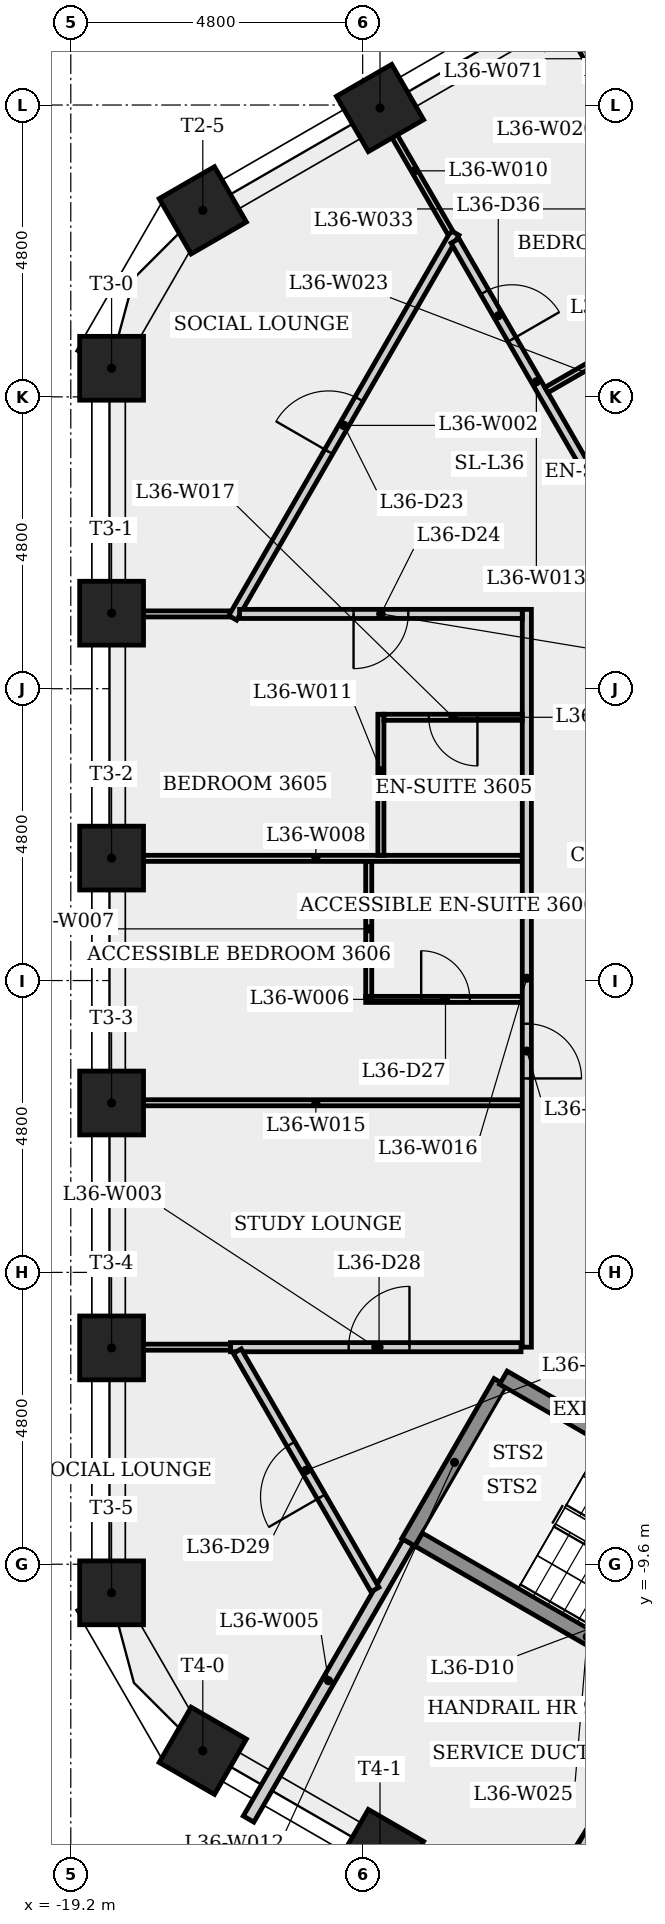
"""IFC4 building model, lengths in metres.
Left out: names, types, materials, properties, quantities, classifications, styles, units other than length and angle.
Written with IfcOpenShell. Run it as: python <this file> out.ifc"""

import sys

from ifc_helpers import new_model, si_unit, direction, frame, frame_2d, origin, origin_2d, place, context, subcontext, project, spatial, rectangle, extrude, element, fill, save


model = new_model("IFC4")
c1 = context("Model", 3, precision=1e-05, world=origin(), true_north=direction((0.0, 1.0)))
c2 = subcontext(c1, "Body", "Model", "MODEL_VIEW")
j1 = project(units=[si_unit("LENGTHUNIT", "METRE"), si_unit("PLANEANGLEUNIT", "RADIAN")], contexts=[c1])
p1 = place(None, origin())
s1 = spatial("IfcSite", under=j1, at=p1, CompositionType="ELEMENT")
p2 = place(p1, origin())
s2 = spatial("IfcBuilding", under=s1, at=p2, CompositionType="ELEMENT")
p3 = place(p2, frame((0.0, 0.0, 135.9)))
s3 = spatial("IfcBuildingStorey", under=s2, at=p3, CompositionType="ELEMENT", Elevation=135.9)
for number, where, z_axis, x_axis in (
    (1, (-14.115, 14.351, 0.0), (0.0, 0.0, 1.0), (-0.5, 0.866, 0.0)),
    (2, (-17.029, 12.668, 0.0), (0.0, 0.0, 1.0), (-0.5, 0.866, 0.0)),
    (3, (-18.529, 10.07, 0.0), (0.0, 0.0, 1.0), (-1.0, 0.0, 0.0)),
    (4, (-18.529, 6.042, 0.0), (0.0, 0.0, 1.0), (-1.0, 0.0, 0.0)),
    (5, (-18.529, 2.014, 0.0), (0.0, 0.0, 1.0), (-1.0, 0.0, 0.0)),
    (6, (-18.529, -2.014, 0.0), (0.0, 0.0, 1.0), (-1.0, 0.0, 0.0)),
    (7, (-18.529, -6.042, 0.0), (0.0, 0.0, 1.0), (-1.0, 0.0, 0.0)),
    (8, (-18.529, -10.07, 0.0), (0.0, 0.0, 1.0), (-1.0, 0.0, 0.0)),
    (9, (-17.029, -12.668, 0.0), (0.0, 0.0, 1.0), (-0.5, -0.866, 0.0)),
    (10, (-14.115, -14.351, 0.0), (0.0, 0.0, 1.0), (-0.5, -0.866, 0.0)),
):
    element("IfcColumn", number, at=place(p3, frame(where, z_axis=z_axis, x_axis=x_axis)), inside=s3, PredefinedType="COLUMN", context=c2, shape_type="SweptSolid", body=[
        extrude(rectangle(XDim=1.05, YDim=1.05, at=origin_2d()), origin(), (0.0, 0.0, 1.0), 4.0),
    ])
p4 = place(p3, frame((-16.574, 6.03, 0.0), z_axis=(0.0, 0.0, 1.0), x_axis=(-1.0, 0.0, 0.0)))
e11 = element("IfcWall", 11, at=p4, inside=s3, PredefinedType="PARTITIONING", context=c2, shape_type="SweptSolid", body=[
    extrude(rectangle(XDim=1.99, YDim=0.1, at=frame_2d((0.995, 0.0))), origin(), (0.0, 0.0, 1.0), 3.6),
])
p5 = place(p3, frame((-16.537, 5.965, 0.0), z_axis=(0.0, 0.0, 1.0), x_axis=(0.500014413017, 0.866017082265, 0.0)))
e12 = element("IfcWall", 12, at=p5, inside=s3, PredefinedType="PARTITIONING", context=c2, shape_type="SweptSolid", body=[
    extrude(rectangle(XDim=7.311, YDim=0.15, at=frame_2d((3.655, 0.0))), origin(), (0.0, 0.0, 1.0), 3.6),
])
p6 = place(p5, frame((3.156, 0.0, 0.0)))
e13 = element("IfcOpeningElement", 13, at=p6, cuts=e12, PredefinedType="OPENING", context=c2, shape_type="SweptSolid", body=[
    extrude(rectangle(XDim=1.0, YDim=2.1, at=frame_2d((0.5, 1.05))), frame((0.0, 0.085, 0.0), z_axis=(0.0, -1.0, 0.0), x_axis=(1.0, 0.0, 0.0)), (0.0, 0.0, 1.0), 0.17),
])
p7 = place(p3, frame((-16.574, -6.03, 0.0), z_axis=(0.0, 0.0, 1.0), x_axis=(1.0, 0.0, 0.0)))
e14 = element("IfcWall", 14, at=p7, inside=s3, PredefinedType="PARTITIONING", context=c2, shape_type="SweptSolid", body=[
    extrude(rectangle(XDim=4.779, YDim=0.15, at=frame_2d((2.389, 0.0))), origin(), (0.0, 0.0, 1.0), 3.6),
])
p8 = place(p7, frame((1.944, 0.0, 0.0)))
e15 = element("IfcOpeningElement", 15, at=p8, cuts=e14, PredefinedType="OPENING", context=c2, shape_type="SweptSolid", body=[
    extrude(rectangle(XDim=1.0, YDim=2.1, at=frame_2d((0.5, 1.05))), frame((0.0, 0.085, 0.0), z_axis=(0.0, -1.0, 0.0), x_axis=(1.0, 0.0, 0.0)), (0.0, 0.0, 1.0), 0.17),
])
p9 = place(p3, frame((-16.574, -6.03, 0.0), z_axis=(0.0, 0.0, 1.0), x_axis=(-1.0, 0.0, 0.0)))
e16 = element("IfcWall", 16, at=p9, inside=s3, PredefinedType="PARTITIONING", context=c2, shape_type="SweptSolid", body=[
    extrude(rectangle(XDim=1.99, YDim=0.1, at=frame_2d((0.995, 0.0))), origin(), (0.0, 0.0, 1.0), 3.6),
])
p10 = place(p3, frame((-16.276, -13.791, 0.0), z_axis=(0.0, 0.0, 1.0), x_axis=(0.499970375258, 0.866042506961, 0.0)))
e17 = element("IfcWall", 17, at=p10, inside=s3, PredefinedType="PLUMBINGWALL", context=c2, shape_type="SweptSolid", body=[
    extrude(rectangle(XDim=5.257, YDim=0.2, at=frame_2d((2.628, 0.0))), origin(), (0.0, 0.0, 1.0), 3.6),
])
p11 = place(p3, frame((-14.35, -0.31, 0.0), z_axis=(0.0, 0.0, 1.0), x_axis=(1.0, 0.0, 0.0)))
e18 = element("IfcWall", 18, at=p11, inside=s3, PredefinedType="PARTITIONING", context=c2, shape_type="SweptSolid", body=[
    extrude(rectangle(XDim=2.575, YDim=0.1, at=frame_2d((1.288, 0.0))), origin(), (0.0, 0.0, 1.0), 3.6),
])
p12 = place(p11, frame((0.913, 0.0, 0.0)))
e19 = element("IfcOpeningElement", 19, at=p12, cuts=e18, PredefinedType="OPENING", context=c2, shape_type="SweptSolid", body=[
    extrude(rectangle(XDim=0.8, YDim=2.1, at=frame_2d((0.4, 1.05))), frame((0.0, 0.06, 0.0), z_axis=(0.0, -1.0, 0.0), x_axis=(1.0, 0.0, 0.0)), (0.0, 0.0, 1.0), 0.12),
])
p13 = place(p3, frame((-14.3, 1.96, 0.0), z_axis=(0.0, 0.0, 1.0), x_axis=(0.0, -1.0, 0.0)))
e20 = element("IfcWall", 20, at=p13, inside=s3, PredefinedType="PARTITIONING", context=c2, shape_type="SweptSolid", body=[
    extrude(rectangle(XDim=2.22, YDim=0.1, at=frame_2d((1.11, 0.0))), origin(), (0.0, 0.0, 1.0), 3.6),
])
p14 = place(p3, frame((-18.564, 2.01, 0.0), z_axis=(0.0, 0.0, 1.0), x_axis=(1.0, 0.0, 0.0)))
e21 = element("IfcWall", 21, at=p14, inside=s3, PredefinedType="PARTITIONING", context=c2, shape_type="SweptSolid", body=[
    extrude(rectangle(XDim=6.789, YDim=0.1, at=frame_2d((3.395, 0.0))), origin(), (0.0, 0.0, 1.0), 3.6),
])
p15 = place(p3, frame((-14.197, -10.017, 0.0), z_axis=(0.0, 0.0, 1.0), x_axis=(-0.500035089595, 0.866005143849, 0.0)))
e22 = element("IfcWall", 22, at=p15, inside=s3, PredefinedType="PARTITIONING", context=c2, shape_type="SweptSolid", body=[
    extrude(rectangle(XDim=4.529, YDim=0.15, at=frame_2d((2.265, 0.0))), origin(), (0.0, 0.0, 1.0), 3.6),
])
p16 = place(p15, frame((1.764, 0.0, 0.0)))
e23 = element("IfcOpeningElement", 23, at=p16, cuts=e22, PredefinedType="OPENING", context=c2, shape_type="SweptSolid", body=[
    extrude(rectangle(XDim=1.0, YDim=2.1, at=frame_2d((0.5, 1.05))), frame((0.0, 0.085, 0.0), z_axis=(0.0, -1.0, 0.0), x_axis=(1.0, 0.0, 0.0)), (0.0, 0.0, 1.0), 0.17),
])
p17 = place(p3, frame((-14.135, 14.339, 0.0), z_axis=(0.0, 0.0, 1.0), x_axis=(0.499991277142, -0.86603043987, 0.0)))
e24 = element("IfcWall", 24, at=p17, inside=s3, PredefinedType="PARTITIONING", context=c2, shape_type="SweptSolid", body=[
    extrude(rectangle(XDim=2.358, YDim=0.1, at=frame_2d((1.179, 0.0))), origin(), (0.0, 0.0, 1.0), 3.6),
])
p18 = place(p3, frame((-14.1, 4.38, 0.0), z_axis=(0.0, 0.0, 1.0), x_axis=(0.0, -1.0, 0.0)))
e25 = element("IfcWall", 25, at=p18, inside=s3, PredefinedType="PARTITIONING", context=c2, shape_type="SweptSolid", body=[
    extrude(rectangle(XDim=2.32, YDim=0.1, at=frame_2d((1.16, 0.0))), origin(), (0.0, 0.0, 1.0), 3.6),
])
p19 = place(p3, frame((-13.648, -9.239, 0.0), z_axis=(0.0, 0.0, 1.0), x_axis=(0.50000556753, 0.866022189346, 0.0)))
e26 = element("IfcWall", 26, at=p19, inside=s3, PredefinedType="SHEAR", context=c2, shape_type="SweptSolid", body=[
    extrude(rectangle(XDim=3.036, YDim=0.25, at=frame_2d((1.518, 0.0))), origin(), (0.0, 0.0, 1.0), 3.6),
])
p20 = place(p3, frame((-12.881, 12.167, 0.0), z_axis=(0.0, 0.0, 1.0), x_axis=(0.500034386872, -0.866005549604, 0.0)))
e27 = element("IfcWall", 27, at=p20, inside=s3, PredefinedType="PARTITIONING", context=c2, shape_type="SweptSolid", body=[
    extrude(rectangle(XDim=5.352, YDim=0.15, at=frame_2d((2.676, 0.0))), origin(), (0.0, 0.0, 1.0), 3.6),
])
p21 = place(p20, frame((0.974, 0.0, 0.0)))
e28 = element("IfcOpeningElement", 28, at=p21, cuts=e27, PredefinedType="OPENING", context=c2, shape_type="SweptSolid", body=[
    extrude(rectangle(XDim=0.9, YDim=2.1, at=frame_2d((0.45, 1.05))), frame((0.0, 0.085, 0.0), z_axis=(0.0, -1.0, 0.0), x_axis=(1.0, 0.0, 0.0)), (0.0, 0.0, 1.0), 0.17),
])
p22 = place(p3, frame((-12.085, -6.532, 0.0), z_axis=(0.0, 0.0, 1.0), x_axis=(0.86604373436, -0.499968249168, 0.0)))
e29 = element("IfcWall", 29, at=p22, inside=s3, PredefinedType="SHEAR", context=c2, shape_type="SweptSolid", body=[
    extrude(rectangle(XDim=1.118, YDim=0.25, at=frame_2d((0.559, 0.0))), origin(), (0.0, 0.0, 1.0), 3.6),
])
p23 = place(p3, frame((-11.775, -2.01, 0.0), z_axis=(0.0, 0.0, 1.0), x_axis=(-1.0, 0.0, 0.0)))
e30 = element("IfcWall", 30, at=p23, inside=s3, PredefinedType="PARTITIONING", context=c2, shape_type="SweptSolid", body=[
    extrude(rectangle(XDim=6.789, YDim=0.1, at=frame_2d((3.395, 0.0))), origin(), (0.0, 0.0, 1.0), 3.6),
])
p24 = place(p3, frame((-11.7, 6.105, 0.0), z_axis=(0.0, 0.0, 1.0), x_axis=(0.0, -1.0, 0.0)))
e31 = element("IfcWall", 31, at=p24, inside=s3, PredefinedType="PARTITIONING", context=c2, shape_type="SweptSolid", body=[
    extrude(rectangle(XDim=12.135, YDim=0.15, at=frame_2d((6.067, 0.0))), origin(), (0.0, 0.0, 1.0), 3.6),
])
p25 = place(p24, frame((6.815, 0.0, 0.0)))
e32 = element("IfcOpeningElement", 32, at=p25, cuts=e31, PredefinedType="OPENING", context=c2, shape_type="SweptSolid", body=[
    extrude(rectangle(XDim=0.9, YDim=2.1, at=frame_2d((0.45, 1.05))), frame((0.0, 0.085, 0.0), z_axis=(0.0, -1.0, 0.0), x_axis=(1.0, 0.0, 0.0)), (0.0, 0.0, 1.0), 0.17),
])
p26 = place(p3, frame((-11.775, 4.33, 0.0), z_axis=(0.0, 0.0, 1.0), x_axis=(-1.0, 0.0, 0.0)))
e33 = element("IfcWall", 33, at=p26, inside=s3, PredefinedType="PARTITIONING", context=c2, shape_type="SweptSolid", body=[
    extrude(rectangle(XDim=2.275, YDim=0.1, at=frame_2d((1.138, 0.0))), origin(), (0.0, 0.0, 1.0), 3.6),
])
p27 = place(p26, frame((0.738, 0.0, 0.0)))
e34 = element("IfcOpeningElement", 34, at=p27, cuts=e33, PredefinedType="OPENING", context=c2, shape_type="SweptSolid", body=[
    extrude(rectangle(XDim=0.8, YDim=2.1, at=frame_2d((0.4, 1.05))), frame((0.0, 0.06, 0.0), z_axis=(0.0, -1.0, 0.0), x_axis=(1.0, 0.0, 0.0)), (0.0, 0.0, 1.0), 0.12),
])
p28 = place(p3, frame((-11.775, 6.03, 0.0), z_axis=(0.0, 0.0, 1.0), x_axis=(-1.0, 0.0, 0.0)))
e35 = element("IfcWall", 35, at=p28, inside=s3, PredefinedType="PARTITIONING", context=c2, shape_type="SweptSolid", body=[
    extrude(rectangle(XDim=4.649, YDim=0.15, at=frame_2d((2.325, 0.0))), origin(), (0.0, 0.0, 1.0), 3.6),
])
p29 = place(p28, frame((1.875, 0.0, 0.0)))
e36 = element("IfcOpeningElement", 36, at=p29, cuts=e35, PredefinedType="OPENING", context=c2, shape_type="SweptSolid", body=[
    extrude(rectangle(XDim=0.9, YDim=2.1, at=frame_2d((0.45, 1.05))), frame((0.0, 0.085, 0.0), z_axis=(0.0, -1.0, 0.0), x_axis=(1.0, 0.0, 0.0)), (0.0, 0.0, 1.0), 0.17),
])
p30 = place(p3, frame((-11.1, -7.101, 0.0), z_axis=(0.0, 0.0, 1.0), x_axis=(0.866028615007, -0.499994437958, 0.0)))
e37 = element("IfcWall", 37, at=p30, inside=s3, PredefinedType="SHEAR", context=c2, shape_type="SweptSolid", body=[
    extrude(rectangle(XDim=5.387, YDim=0.25, at=frame_2d((2.694, 0.0))), origin(), (0.0, 0.0, 1.0), 3.6),
])
p31 = place(p30, frame((4.012, 0.0, 0.0)))
e38 = element("IfcOpeningElement", 38, at=p31, cuts=e37, PredefinedType="OPENING", context=c2, shape_type="SweptSolid", body=[
    extrude(rectangle(XDim=1.0, YDim=2.1, at=frame_2d((0.5, 1.05))), frame((0.0, 0.135, 0.0), z_axis=(0.0, -1.0, 0.0), x_axis=(1.0, 0.0, 0.0)), (0.0, 0.0, 1.0), 0.27),
])
p32 = place(p3, frame((-9.943, 10.541, 0.0), z_axis=(0.0, 0.0, 1.0), x_axis=(-0.866057962423, -0.499943602543, 0.0)))
e39 = element("IfcWall", 39, at=p32, inside=s3, PredefinedType="PARTITIONING", context=c2, shape_type="SweptSolid", body=[
    extrude(rectangle(XDim=1.656, YDim=0.1, at=frame_2d((0.828, 0.0))), origin(), (0.0, 0.0, 1.0), 3.6),
])
p33 = place(p3, frame((-7.935, -12.393, 0.0), z_axis=(0.0, 0.0, 1.0), x_axis=(-0.866025499775, 0.499999833739, 0.0)))
e40 = element("IfcWall", 40, at=p33, inside=s3, PredefinedType="SHEAR", context=c2, shape_type="SweptSolid", body=[
    extrude(rectangle(XDim=6.4, YDim=0.25, at=frame_2d((3.2, 0.0))), origin(), (0.0, 0.0, 1.0), 3.6),
])
p34 = place(p3, frame((-7.352, 9.352, 0.0), z_axis=(0.0, 0.0, 1.0), x_axis=(-0.499997453958, 0.866026873738, 0.0)))
e41 = element("IfcWall", 41, at=p34, inside=s3, PredefinedType="PARTITIONING", context=c2, shape_type="SweptSolid", body=[
    extrude(rectangle(XDim=7.71, YDim=0.1, at=frame_2d((3.855, 0.0))), origin(), (0.0, 0.0, 1.0), 3.6),
])
p35 = place(p3, frame((-10.805, -14.315, 0.0), z_axis=(0.0, 0.0, 1.0), x_axis=(0.500086491905, 0.8659754619, 0.0)))
e42 = element("IfcWall", 42, at=p35, inside=s3, PredefinedType="PLUMBINGWALL", context=c2, shape_type="SweptSolid", body=[
    extrude(rectangle(XDim=2.98, YDim=0.2, at=frame_2d((1.49, 0.0))), origin(), (0.0, 0.0, 1.0), 3.6),
])
p36 = place(p6, origin())
e43 = element("IfcDoor", 43, at=p36, inside=s3, OperationType="SINGLE_SWING_LEFT", PredefinedType="DOOR", context=c2, shape_type="SweptSolid", body=[
    extrude(rectangle(XDim=1.0, YDim=2.1, at=frame_2d((0.5, 1.05))), frame((0.0, 0.025, 0.0), z_axis=(0.0, -1.0, 0.0), x_axis=(1.0, 0.0, 0.0)), (0.0, 0.0, 1.0), 0.05),
])
fill(e13, e43)
p37 = place(p29, origin())
e44 = element("IfcDoor", 44, at=p37, inside=s3, OperationType="SINGLE_SWING_RIGHT", PredefinedType="DOOR", context=c2, shape_type="SweptSolid", body=[
    extrude(rectangle(XDim=0.9, YDim=2.1, at=frame_2d((0.45, 1.05))), frame((0.0, 0.025, 0.0), z_axis=(0.0, -1.0, 0.0), x_axis=(1.0, 0.0, 0.0)), (0.0, 0.0, 1.0), 0.05),
])
fill(e36, e44)
p38 = place(p27, origin())
e45 = element("IfcDoor", 45, at=p38, inside=s3, OperationType="SINGLE_SWING_LEFT", PredefinedType="DOOR", context=c2, shape_type="SweptSolid", body=[
    extrude(rectangle(XDim=0.8, YDim=2.1, at=frame_2d((0.4, 1.05))), frame((0.0, 0.025, 0.0), z_axis=(0.0, -1.0, 0.0), x_axis=(1.0, 0.0, 0.0)), (0.0, 0.0, 1.0), 0.05),
])
fill(e34, e45)
p39 = place(p25, origin())
e46 = element("IfcDoor", 46, at=p39, inside=s3, OperationType="SINGLE_SWING_RIGHT", PredefinedType="DOOR", context=c2, shape_type="SweptSolid", body=[
    extrude(rectangle(XDim=0.9, YDim=2.1, at=frame_2d((0.45, 1.05))), frame((0.0, 0.025, 0.0), z_axis=(0.0, -1.0, 0.0), x_axis=(1.0, 0.0, 0.0)), (0.0, 0.0, 1.0), 0.05),
])
fill(e32, e46)
p40 = place(p12, origin())
e47 = element("IfcDoor", 47, at=p40, inside=s3, OperationType="SINGLE_SWING_LEFT", PredefinedType="DOOR", context=c2, shape_type="SweptSolid", body=[
    extrude(rectangle(XDim=0.8, YDim=2.1, at=frame_2d((0.4, 1.05))), frame((0.0, 0.025, 0.0), z_axis=(0.0, -1.0, 0.0), x_axis=(1.0, 0.0, 0.0)), (0.0, 0.0, 1.0), 0.05),
])
fill(e19, e47)
p41 = place(p8, origin())
e48 = element("IfcDoor", 48, at=p41, inside=s3, OperationType="SINGLE_SWING_RIGHT", PredefinedType="DOOR", context=c2, shape_type="SweptSolid", body=[
    extrude(rectangle(XDim=1.0, YDim=2.1, at=frame_2d((0.5, 1.05))), frame((0.0, 0.025, 0.0), z_axis=(0.0, -1.0, 0.0), x_axis=(1.0, 0.0, 0.0)), (0.0, 0.0, 1.0), 0.05),
])
fill(e15, e48)
p42 = place(p16, origin())
e49 = element("IfcDoor", 49, at=p42, inside=s3, OperationType="SINGLE_SWING_LEFT", PredefinedType="DOOR", context=c2, shape_type="SweptSolid", body=[
    extrude(rectangle(XDim=1.0, YDim=2.1, at=frame_2d((0.5, 1.05))), frame((0.0, 0.025, 0.0), z_axis=(0.0, -1.0, 0.0), x_axis=(1.0, 0.0, 0.0)), (0.0, 0.0, 1.0), 0.05),
])
fill(e23, e49)
p43 = place(p21, origin())
e50 = element("IfcDoor", 50, at=p43, inside=s3, OperationType="SINGLE_SWING_RIGHT", PredefinedType="DOOR", context=c2, shape_type="SweptSolid", body=[
    extrude(rectangle(XDim=0.9, YDim=2.1, at=frame_2d((0.45, 1.05))), frame((0.0, 0.025, 0.0), z_axis=(0.0, -1.0, 0.0), x_axis=(1.0, 0.0, 0.0)), (0.0, 0.0, 1.0), 0.05),
])
fill(e28, e50)
save(model, sys.argv[1])
